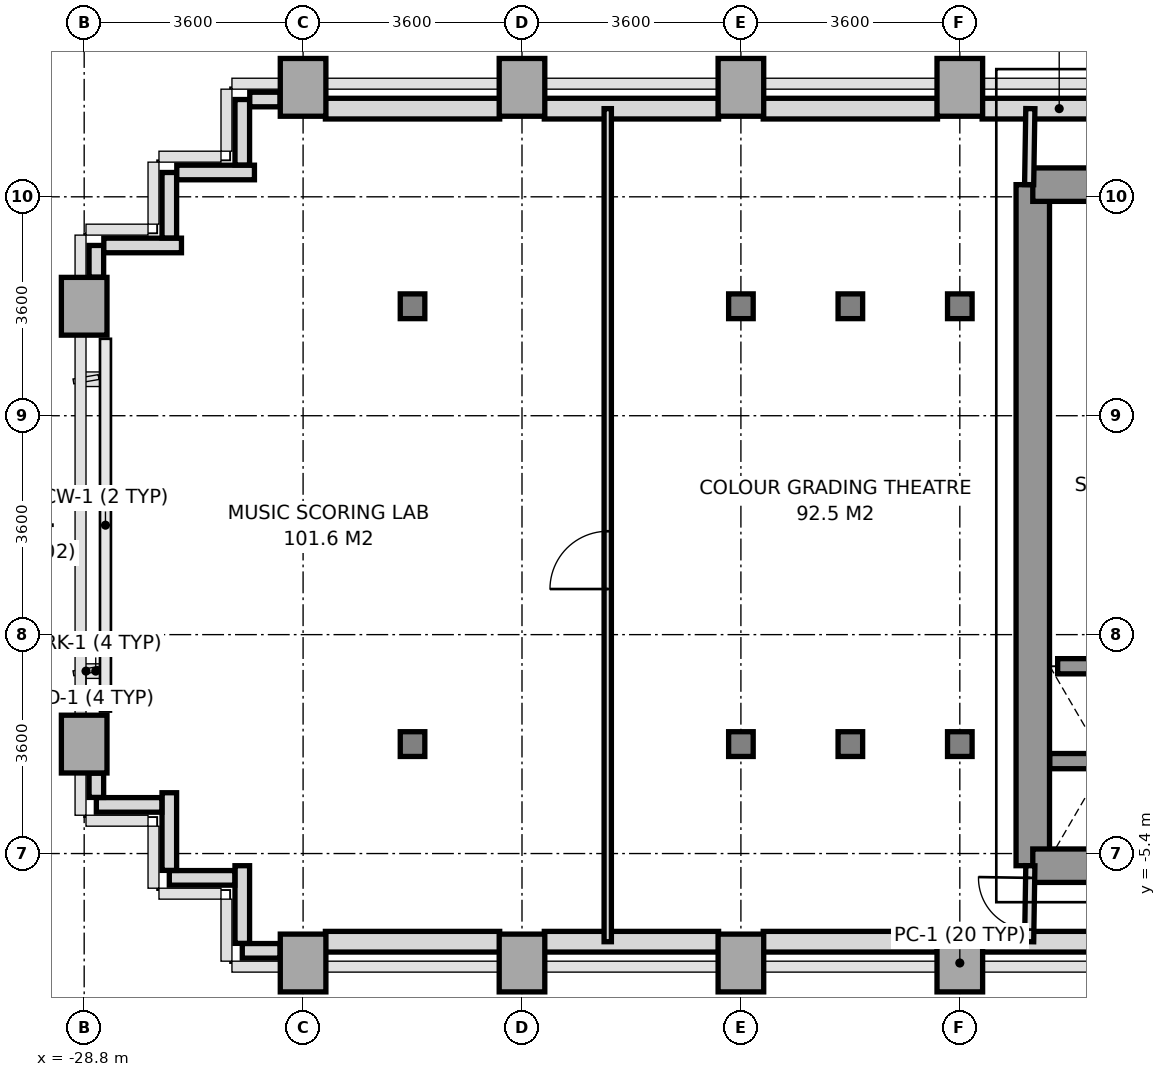
"""IFC4 building model, lengths in metres.
Left out: names, types, materials, properties, quantities, classifications, styles, units other than length and angle.
Written with IfcOpenShell. Run it as: python <this file> out.ifc"""

import sys

from ifc_helpers import new_model, si_unit, direction, frame, frame_2d, origin, origin_2d, place, context, subcontext, project, spatial, rectangle, i_section, extrude, source, transform, mapped, element, fill, save


model = new_model("IFC4")
c1 = context("Model", 3, precision=1e-05, world=origin(), true_north=direction((0.0, 1.0)))
c2 = subcontext(c1, "Body", "Model", "MODEL_VIEW")
j1 = project(units=[si_unit("LENGTHUNIT", "METRE"), si_unit("PLANEANGLEUNIT", "RADIAN")], contexts=[c1])
p1 = place(None, origin())
s1 = spatial("IfcSite", under=j1, at=p1, CompositionType="ELEMENT")
p2 = place(p1, origin())
s2 = spatial("IfcBuilding", under=s1, at=p2, CompositionType="ELEMENT")
p3 = place(p2, frame((0.0, 0.0, 85.0)))
s3 = spatial("IfcBuildingStorey", under=s2, at=p3, CompositionType="ELEMENT", Elevation=85.0)
m1 = source(origin(), c2, "Body", "SweptSolid", [
    extrude(rectangle(XDim=0.75, YDim=0.95, at=origin_2d()), origin(), (0.0, 0.0, 1.0), 3.14),
])
for number, where, z_axis, x_axis in (
    (1, (-28.8, -3.6, 0.0), (0.0, 0.0, 1.0), (1.0, 0.0, 0.0)),
    (2, (-28.8, 3.6, 0.0), (0.0, 0.0, 1.0), (1.0, 0.0, 0.0)),
    (3, (-25.2, -7.2, 0.0), (0.0, 0.0, 1.0), (1.0, 0.0, 0.0)),
    (4, (-25.2, 7.2, 0.0), (0.0, 0.0, 1.0), (1.0, 0.0, 0.0)),
):
    element("IfcColumn", number, at=place(p3, frame(where, z_axis=z_axis, x_axis=x_axis)), inside=s3, PredefinedType="COLUMN", context=c2, shape_type="MappedRepresentation", body=[
        mapped(m1, transform((0.0, 0.0, 0.0), x_axis=(1.0, 0.0, 0.0), y_axis=(0.0, 1.0, 0.0), z_axis=(0.0, 0.0, 1.0), scale=1.0)),
    ])
m2 = source(origin(), c2, "Body", "SweptSolid", [
    extrude(i_section(OverallWidth=0.404, OverallDepth=0.407, WebThickness=0.022, FlangeThickness=0.035, at=origin_2d()), origin(), (0.0, 0.0, 1.0), 3.14),
])
for number, where, z_axis, x_axis in (
    (5, (-23.4, -3.6, 0.0), (0.0, 0.0, 1.0), (1.0, 0.0, 0.0)),
    (6, (-23.4, 3.6, 0.0), (0.0, 0.0, 1.0), (1.0, 0.0, 0.0)),
):
    element("IfcColumn", number, at=place(p3, frame(where, z_axis=z_axis, x_axis=x_axis)), inside=s3, PredefinedType="COLUMN", context=c2, shape_type="MappedRepresentation", body=[
        mapped(m2, transform((0.0, 0.0, 0.0), x_axis=(1.0, 0.0, 0.0), y_axis=(0.0, 1.0, 0.0), z_axis=(0.0, 0.0, 1.0), scale=1.0)),
    ])
for number, where, z_axis, x_axis in (
    (7, (-21.6, -7.2, 0.0), (0.0, 0.0, 1.0), (1.0, 0.0, 0.0)),
    (8, (-21.6, 7.2, 0.0), (0.0, 0.0, 1.0), (1.0, 0.0, 0.0)),
    (9, (-18.0, -7.2, 0.0), (0.0, 0.0, 1.0), (1.0, 0.0, 0.0)),
):
    element("IfcColumn", number, at=place(p3, frame(where, z_axis=z_axis, x_axis=x_axis)), inside=s3, PredefinedType="COLUMN", context=c2, shape_type="MappedRepresentation", body=[
        mapped(m1, transform((0.0, 0.0, 0.0), x_axis=(1.0, 0.0, 0.0), y_axis=(0.0, 1.0, 0.0), z_axis=(0.0, 0.0, 1.0), scale=1.0)),
    ])
for number, where, z_axis, x_axis in (
    (10, (-18.0, -3.6, 0.0), (0.0, 0.0, 1.0), (1.0, 0.0, 0.0)),
    (11, (-18.0, 3.6, 0.0), (0.0, 0.0, 1.0), (1.0, 0.0, 0.0)),
):
    element("IfcColumn", number, at=place(p3, frame(where, z_axis=z_axis, x_axis=x_axis)), inside=s3, PredefinedType="COLUMN", context=c2, shape_type="MappedRepresentation", body=[
        mapped(m2, transform((0.0, 0.0, 0.0), x_axis=(1.0, 0.0, 0.0), y_axis=(0.0, 1.0, 0.0), z_axis=(0.0, 0.0, 1.0), scale=1.0)),
    ])
p4 = place(p3, frame((-18.0, 7.2, 0.0), z_axis=(0.0, 0.0, 1.0), x_axis=(1.0, 0.0, 0.0)))
e12 = element("IfcColumn", 12, at=p4, inside=s3, PredefinedType="COLUMN", context=c2, shape_type="MappedRepresentation", body=[
    mapped(m1, transform((0.0, 0.0, 0.0), x_axis=(1.0, 0.0, 0.0), y_axis=(0.0, 1.0, 0.0), z_axis=(0.0, 0.0, 1.0), scale=1.0)),
])
for number, where, z_axis, x_axis in (
    (13, (-16.2, -3.6, 0.0), (0.0, 0.0, 1.0), (1.0, 0.0, 0.0)),
    (14, (-16.2, 3.6, 0.0), (0.0, 0.0, 1.0), (1.0, 0.0, 0.0)),
):
    element("IfcColumn", number, at=place(p3, frame(where, z_axis=z_axis, x_axis=x_axis)), inside=s3, PredefinedType="COLUMN", context=c2, shape_type="MappedRepresentation", body=[
        mapped(m2, transform((0.0, 0.0, 0.0), x_axis=(1.0, 0.0, 0.0), y_axis=(0.0, 1.0, 0.0), z_axis=(0.0, 0.0, 1.0), scale=1.0)),
    ])
p5 = place(p3, frame((-14.4, -7.2, 0.0), z_axis=(0.0, 0.0, 1.0), x_axis=(1.0, 0.0, 0.0)))
e15 = element("IfcColumn", 15, at=p5, inside=s3, PredefinedType="COLUMN", context=c2, shape_type="MappedRepresentation", body=[
    mapped(m1, transform((0.0, 0.0, 0.0), x_axis=(1.0, 0.0, 0.0), y_axis=(0.0, 1.0, 0.0), z_axis=(0.0, 0.0, 1.0), scale=1.0)),
])
for number, where, z_axis, x_axis in (
    (16, (-14.4, -3.6, 0.0), (0.0, 0.0, 1.0), (1.0, 0.0, 0.0)),
    (17, (-14.4, 3.6, 0.0), (0.0, 0.0, 1.0), (1.0, 0.0, 0.0)),
):
    element("IfcColumn", number, at=place(p3, frame(where, z_axis=z_axis, x_axis=x_axis)), inside=s3, PredefinedType="COLUMN", context=c2, shape_type="MappedRepresentation", body=[
        mapped(m2, transform((0.0, 0.0, 0.0), x_axis=(1.0, 0.0, 0.0), y_axis=(0.0, 1.0, 0.0), z_axis=(0.0, 0.0, 1.0), scale=1.0)),
    ])
p6 = place(p3, frame((-14.4, 7.2, 0.0), z_axis=(0.0, 0.0, 1.0), x_axis=(1.0, 0.0, 0.0)))
e18 = element("IfcColumn", 18, at=p6, inside=s3, PredefinedType="COLUMN", context=c2, shape_type="MappedRepresentation", body=[
    mapped(m1, transform((0.0, 0.0, 0.0), x_axis=(1.0, 0.0, 0.0), y_axis=(0.0, 1.0, 0.0), z_axis=(0.0, 0.0, 1.0), scale=1.0)),
])
for number, where, z_axis, x_axis in (
    (19, (-24.833, 6.85, 0.0), (0.0, 0.0, 1.0), (1.0, 0.0, 0.0)),
    (20, (-21.233, 6.85, 0.0), (0.0, 0.0, 1.0), (1.0, 0.0, 0.0)),
    (21, (-17.633, 6.85, 0.0), (0.0, 0.0, 1.0), (1.0, 0.0, 0.0)),
):
    element("IfcWall", number, at=place(p3, frame(where, z_axis=z_axis, x_axis=x_axis)), inside=s3, PredefinedType="SOLIDWALL", context=c2, shape_type="SweptSolid", body=[
        extrude(rectangle(XDim=2.866, YDim=0.34, at=frame_2d((1.433, 0.0))), origin(), (0.0, 0.0, 1.0), 2.39),
    ])
p7 = place(p3, frame((-14.033, 6.85, 0.0), z_axis=(0.0, 0.0, 1.0), x_axis=(1.0, 0.0, 0.0)))
e22 = element("IfcWall", 22, at=p7, inside=s3, PredefinedType="SOLIDWALL", context=c2, shape_type="SweptSolid", body=[
    extrude(rectangle(XDim=2.535, YDim=0.34, at=frame_2d((1.268, 0.0))), origin(), (0.0, 0.0, 1.0), 3.14),
])
for number, where, z_axis, x_axis in (
    (23, (-24.833, -6.85, 0.0), (0.0, 0.0, 1.0), (1.0, 0.0, 0.0)),
    (24, (-21.233, -6.85, 0.0), (0.0, 0.0, 1.0), (1.0, 0.0, 0.0)),
    (25, (-17.633, -6.85, 0.0), (0.0, 0.0, 1.0), (1.0, 0.0, 0.0)),
):
    element("IfcWall", number, at=place(p3, frame(where, z_axis=z_axis, x_axis=x_axis)), inside=s3, PredefinedType="SOLIDWALL", context=c2, shape_type="SweptSolid", body=[
        extrude(rectangle(XDim=2.866, YDim=0.34, at=frame_2d((1.433, 0.0))), origin(), (0.0, 0.0, 1.0), 2.39),
    ])
p8 = place(p3, frame((-14.033, -6.85, 0.0), z_axis=(0.0, 0.0, 1.0), x_axis=(1.0, 0.0, 0.0)))
e26 = element("IfcWall", 26, at=p8, inside=s3, PredefinedType="SOLIDWALL", context=c2, shape_type="SweptSolid", body=[
    extrude(rectangle(XDim=2.283, YDim=0.34, at=frame_2d((1.142, 0.0))), origin(), (0.0, 0.0, 1.0), 3.14),
])
p9 = place(p3, frame((-25.578, -7.0, 0.0), z_axis=(0.0, 0.0, 1.0), x_axis=(-1.0, 0.0, 0.0)))
e27 = element("IfcWall", 27, at=p9, inside=s3, PredefinedType="PARAPET", context=c2, shape_type="SweptSolid", body=[
    extrude(rectangle(XDim=0.622, YDim=0.24, at=frame_2d((0.311, 0.0))), origin(), (0.0, 0.0, 1.0), 1.15),
])
p10 = place(p3, frame((-26.2, -6.877, 0.0), z_axis=(0.0, 0.0, 1.0), x_axis=(0.0, 1.0, 0.0)))
e28 = element("IfcWall", 28, at=p10, inside=s3, PredefinedType="PARAPET", context=c2, shape_type="SweptSolid", body=[
    extrude(rectangle(XDim=1.277, YDim=0.24, at=frame_2d((0.638, 0.0))), origin(), (0.0, 0.0, 1.0), 1.15),
])
p11 = place(p3, frame((-26.323, -5.8, 0.0), z_axis=(0.0, 0.0, 1.0), x_axis=(-1.0, 0.0, 0.0)))
e29 = element("IfcWall", 29, at=p11, inside=s3, PredefinedType="PARAPET", context=c2, shape_type="SweptSolid", body=[
    extrude(rectangle(XDim=1.077, YDim=0.24, at=frame_2d((0.539, 0.0))), origin(), (0.0, 0.0, 1.0), 1.15),
])
p12 = place(p3, frame((-27.4, -5.677, 0.0), z_axis=(0.0, 0.0, 1.0), x_axis=(0.0, 1.0, 0.0)))
e30 = element("IfcWall", 30, at=p12, inside=s3, PredefinedType="PARAPET", context=c2, shape_type="SweptSolid", body=[
    extrude(rectangle(XDim=1.277, YDim=0.24, at=frame_2d((0.639, 0.0))), origin(), (0.0, 0.0, 1.0), 1.15),
])
p13 = place(p3, frame((-27.523, -4.6, 0.0), z_axis=(0.0, 0.0, 1.0), x_axis=(-1.0, 0.0, 0.0)))
e31 = element("IfcWall", 31, at=p13, inside=s3, PredefinedType="PARAPET", context=c2, shape_type="SweptSolid", body=[
    extrude(rectangle(XDim=1.077, YDim=0.24, at=frame_2d((0.539, 0.0))), origin(), (0.0, 0.0, 1.0), 1.15),
])
p14 = place(p3, frame((-28.6, -4.477, 0.0), z_axis=(0.0, 0.0, 1.0), x_axis=(0.0, 1.0, 0.0)))
e32 = element("IfcWall", 32, at=p14, inside=s3, PredefinedType="PARAPET", context=c2, shape_type="SweptSolid", body=[
    extrude(rectangle(XDim=0.399, YDim=0.24, at=frame_2d((0.2, 0.0))), origin(), (0.0, 0.0, 1.0), 1.15),
])
p15 = place(p3, frame((-28.6, 4.078, 0.0), z_axis=(0.0, 0.0, 1.0), x_axis=(0.0, 1.0, 0.0)))
e33 = element("IfcWall", 33, at=p15, inside=s3, PredefinedType="PARAPET", context=c2, shape_type="SweptSolid", body=[
    extrude(rectangle(XDim=0.522, YDim=0.24, at=frame_2d((0.261, 0.0))), origin(), (0.0, 0.0, 1.0), 1.15),
])
p16 = place(p3, frame((-28.477, 4.6, 0.0), z_axis=(0.0, 0.0, 1.0), x_axis=(1.0, 0.0, 0.0)))
e34 = element("IfcWall", 34, at=p16, inside=s3, PredefinedType="PARAPET", context=c2, shape_type="SweptSolid", body=[
    extrude(rectangle(XDim=1.277, YDim=0.24, at=frame_2d((0.639, 0.0))), origin(), (0.0, 0.0, 1.0), 1.15),
])
p17 = place(p3, frame((-27.4, 4.723, 0.0), z_axis=(0.0, 0.0, 1.0), x_axis=(0.0, 1.0, 0.0)))
e35 = element("IfcWall", 35, at=p17, inside=s3, PredefinedType="PARAPET", context=c2, shape_type="SweptSolid", body=[
    extrude(rectangle(XDim=1.077, YDim=0.24, at=frame_2d((0.539, 0.0))), origin(), (0.0, 0.0, 1.0), 1.15),
])
p18 = place(p3, frame((-27.277, 5.8, 0.0), z_axis=(0.0, 0.0, 1.0), x_axis=(1.0, 0.0, 0.0)))
e36 = element("IfcWall", 36, at=p18, inside=s3, PredefinedType="PARAPET", context=c2, shape_type="SweptSolid", body=[
    extrude(rectangle(XDim=1.277, YDim=0.24, at=frame_2d((0.639, 0.0))), origin(), (0.0, 0.0, 1.0), 1.15),
])
p19 = place(p3, frame((-26.2, 5.923, 0.0), z_axis=(0.0, 0.0, 1.0), x_axis=(0.0, 1.0, 0.0)))
e37 = element("IfcWall", 37, at=p19, inside=s3, PredefinedType="PARAPET", context=c2, shape_type="SweptSolid", body=[
    extrude(rectangle(XDim=1.077, YDim=0.24, at=frame_2d((0.539, 0.0))), origin(), (0.0, 0.0, 1.0), 1.15),
])
p20 = place(p3, frame((-26.077, 7.0, 0.0), z_axis=(0.0, 0.0, 1.0), x_axis=(1.0, 0.0, 0.0)))
e38 = element("IfcWall", 38, at=p20, inside=s3, PredefinedType="PARAPET", context=c2, shape_type="SweptSolid", body=[
    extrude(rectangle(XDim=0.499, YDim=0.24, at=frame_2d((0.25, 0.0))), origin(), (0.0, 0.0, 1.0), 1.15),
])
p21 = place(p3, frame((-13.2, -5.6, 0.0), z_axis=(0.0, 0.0, 1.0), x_axis=(0.0, 1.0, 0.0)))
e39 = element("IfcWall", 39, at=p21, inside=s3, PredefinedType="SHEAR", context=c2, shape_type="SweptSolid", body=[
    extrude(rectangle(XDim=11.2, YDim=0.55, at=frame_2d((5.6, 0.0))), origin(), (0.0, 0.0, 1.0), 3.14),
])
p22 = place(p3, frame((-13.2, 5.6, 0.0), z_axis=(0.0, 0.0, 1.0), x_axis=(1.0, 0.0, 0.0)))
e40 = element("IfcWall", 40, at=p22, inside=s3, PredefinedType="SHEAR", context=c2, shape_type="SweptSolid", body=[
    extrude(rectangle(XDim=1.819, YDim=0.55, at=frame_2d((0.909, 0.0))), origin(), (0.0, 0.0, 1.0), 3.14),
])
p23 = place(p3, frame((-13.2, -5.6, 0.0), z_axis=(0.0, 0.0, 1.0), x_axis=(1.0, 0.0, 0.0)))
e41 = element("IfcWall", 41, at=p23, inside=s3, PredefinedType="SHEAR", context=c2, shape_type="SweptSolid", body=[
    extrude(rectangle(XDim=7.8, YDim=0.55, at=frame_2d((3.9, 0.0))), origin(), (0.0, 0.0, 1.0), 3.14),
])
p24 = place(p23, frame((3.6, 0.0, 0.0)))
e42 = element("IfcOpeningElement", 42, at=p24, cuts=e41, PredefinedType="OPENING", context=c2, shape_type="SweptSolid", body=[
    extrude(rectangle(XDim=1.2, YDim=2.2, at=frame_2d((0.6, 1.1))), frame((0.0, 0.285, 0.0), z_axis=(0.0, -1.0, 0.0), x_axis=(1.0, 0.0, 0.0)), (0.0, 0.0, 1.0), 0.57),
])
p25 = place(p3, frame((-12.92, -3.88, 0.0), z_axis=(0.0, 0.0, 1.0), x_axis=(1.0, 0.0, 0.0)))
e43 = element("IfcWall", 43, at=p25, inside=s3, PredefinedType="SOLIDWALL", context=c2, shape_type="SweptSolid", body=[
    extrude(rectangle(XDim=1.84, YDim=0.25, at=frame_2d((0.92, 0.0))), origin(), (0.0, 0.0, 1.0), 3.14),
])
p26 = place(p3, frame((-12.791, -2.32, 0.0), z_axis=(0.0, 0.0, 1.0), x_axis=(1.0, 0.0, 0.0)))
e44 = element("IfcWall", 44, at=p26, inside=s3, PredefinedType="SOLIDWALL", context=c2, shape_type="SweptSolid", body=[
    extrude(rectangle(XDim=1.582, YDim=0.25, at=frame_2d((0.791, 0.0))), origin(), (0.0, 0.0, 1.0), 3.14),
])
p27 = place(p3, frame((-13.26, 5.6, 0.0), z_axis=(0.0, 0.0, 1.0), x_axis=(0.016013571389, 0.999871774545, 0.0)))
e45 = element("IfcWall", 45, at=p27, inside=s3, PredefinedType="PARTITIONING", context=c2, shape_type="SweptSolid", body=[
    extrude(rectangle(XDim=1.25, YDim=0.15, at=frame_2d((0.625, 0.0))), origin(), (0.0, 0.0, 1.0), 3.14),
])
p28 = place(p3, frame((-13.26, -6.85, 0.0), z_axis=(0.0, 0.0, 1.0), x_axis=(0.016013571389, 0.999871774545, 0.0)))
e46 = element("IfcWall", 46, at=p28, inside=s3, PredefinedType="PARTITIONING", context=c2, shape_type="SweptSolid", body=[
    extrude(rectangle(XDim=1.25, YDim=0.15, at=frame_2d((0.625, 0.0))), origin(), (0.0, 0.0, 1.0), 3.14),
])
p29 = place(p28, frame((0.2, 0.0, 0.0)))
e47 = element("IfcOpeningElement", 47, at=p29, cuts=e46, PredefinedType="OPENING", context=c2, shape_type="SweptSolid", body=[
    extrude(rectangle(XDim=0.85, YDim=2.1, at=frame_2d((0.425, 1.05))), frame((0.0, 0.085, 0.0), z_axis=(0.0, -1.0, 0.0), x_axis=(1.0, 0.0, 0.0)), (0.0, 0.0, 1.0), 0.17),
])
p30 = place(p3, frame((-20.19, -6.85, 0.0), z_axis=(0.0, 0.0, 1.0), x_axis=(0.0, 1.0, 0.0)))
e48 = element("IfcWall", 48, at=p30, inside=s3, PredefinedType="PARTITIONING", context=c2, shape_type="SweptSolid", body=[
    extrude(rectangle(XDim=13.7, YDim=0.12, at=frame_2d((6.85, 0.0))), origin(), (0.0, 0.0, 1.0), 2.59),
])
p31 = place(p30, frame((5.8, 0.0, 0.0)))
e49 = element("IfcOpeningElement", 49, at=p31, cuts=e48, PredefinedType="OPENING", context=c2, shape_type="SweptSolid", body=[
    extrude(rectangle(XDim=0.95, YDim=2.15, at=frame_2d((0.475, 1.075))), frame((0.0, 0.07, 0.0), z_axis=(0.0, -1.0, 0.0), x_axis=(1.0, 0.0, 0.0)), (0.0, 0.0, 1.0), 0.14),
])
m3 = source(origin(), c2, "Body", "SweptSolid", [
    extrude(rectangle(XDim=0.85, YDim=2.1, at=frame_2d((0.425, 1.05))), frame((0.0, 0.025, 0.0), z_axis=(0.0, -1.0, 0.0), x_axis=(1.0, 0.0, 0.0)), (0.0, 0.0, 1.0), 0.05),
])
p32 = place(p29, origin())
e50 = element("IfcDoor", 50, at=p32, inside=s3, OperationType="SINGLE_SWING_RIGHT", PredefinedType="DOOR", context=c2, shape_type="MappedRepresentation", body=[
    mapped(m3, transform((0.0, 0.0, 0.0), x_axis=(1.0, 0.0, 0.0), y_axis=(0.0, 1.0, 0.0), z_axis=(0.0, 0.0, 1.0), scale=1.0)),
])
fill(e47, e50)
m4 = source(origin(), c2, "Body", "SweptSolid", [
    extrude(rectangle(XDim=0.95, YDim=2.15, at=frame_2d((0.475, 1.075))), frame((0.0, 0.025, 0.0), z_axis=(0.0, -1.0, 0.0), x_axis=(1.0, 0.0, 0.0)), (0.0, 0.0, 1.0), 0.05),
])
p33 = place(p31, origin())
e51 = element("IfcDoor", 51, at=p33, inside=s3, OperationType="SINGLE_SWING_LEFT", PredefinedType="DOOR", context=c2, shape_type="MappedRepresentation", body=[
    mapped(m4, transform((0.0, 0.0, 0.0), x_axis=(1.0, 0.0, 0.0), y_axis=(0.0, 1.0, 0.0), z_axis=(0.0, 0.0, 1.0), scale=1.0)),
])
fill(e49, e51)
save(model, sys.argv[1])
